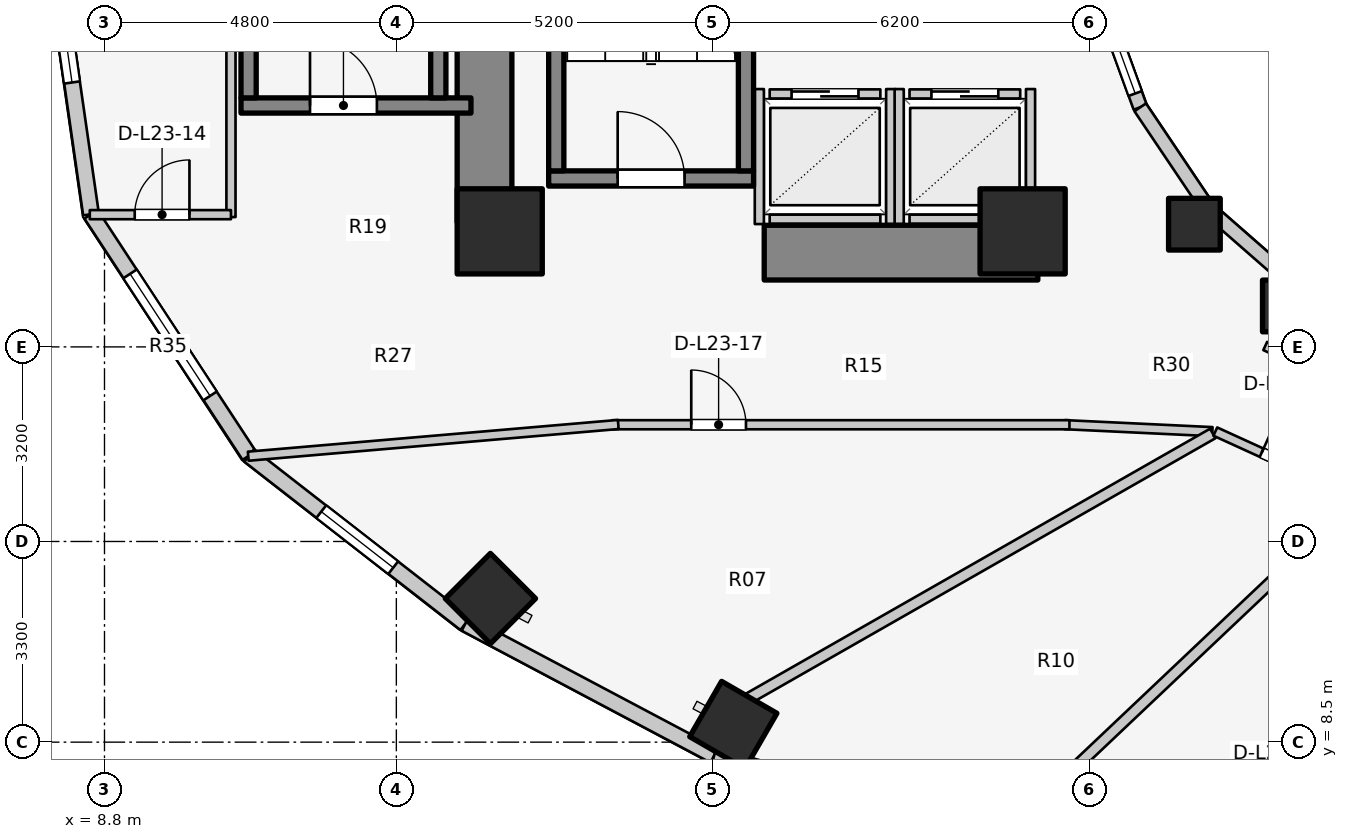
"""IFC4 building model, lengths in metres.
Left out: names, types, materials, properties, quantities, classifications, styles, units other than length and angle.
Written with IfcOpenShell. Run it as: python <this file> out.ifc"""

import sys

from ifc_helpers import new_model, si_unit, direction, frame, frame_2d, origin, origin_2d, place, context, subcontext, project, spatial, rectangle, extrude, element, fill, save


model = new_model("IFC4")
c1 = context("Model", 3, precision=1e-05, world=origin(), true_north=direction((0.0, 1.0)))
c2 = subcontext(c1, "Body", "Model", "MODEL_VIEW")
j1 = project(units=[si_unit("LENGTHUNIT", "METRE"), si_unit("PLANEANGLEUNIT", "RADIAN")], contexts=[c1])
p1 = place(None, origin())
s1 = spatial("IfcSite", under=j1, at=p1, CompositionType="ELEMENT")
p2 = place(p1, origin())
s2 = spatial("IfcBuilding", under=s1, at=p2, CompositionType="ELEMENT")
p3 = place(p2, frame((0.0, 0.0, 79.4)))
s3 = spatial("IfcBuildingStorey", under=s2, at=p3, CompositionType="ELEMENT", Elevation=79.4)
p4 = place(p3, frame((15.05, 17.05, 0.0), z_axis=(0.0, 0.0, 1.0), x_axis=(0.0, 1.0, 0.0)))
e1 = element("IfcWall", 1, at=p4, inside=s3, PredefinedType="SHEAR", context=c2, shape_type="SweptSolid", body=[
    extrude(rectangle(XDim=12.8, YDim=0.9, at=frame_2d((6.4, 0.0))), origin(), (0.0, 0.0, 1.0), 3.1),
])
p5 = place(p3, frame((19.65, 16.55, 0.0), z_axis=(0.0, 0.0, 1.0), x_axis=(1.0, 0.0, 0.0)))
e2 = element("IfcWall", 2, at=p5, inside=s3, PredefinedType="SHEAR", context=c2, shape_type="SweptSolid", body=[
    extrude(rectangle(XDim=4.5, YDim=0.9, at=frame_2d((2.25, 0.0))), origin(), (0.0, 0.0, 1.0), 3.1),
])
p6 = place(p3, frame((16.105, 17.77, 0.0), z_axis=(0.0, 0.0, 1.0), x_axis=(1.0, 0.0, 0.0)))
e3 = element("IfcWall", 3, at=p6, inside=s3, PredefinedType="SOLIDWALL", context=c2, shape_type="SweptSolid", body=[
    extrude(rectangle(XDim=3.37, YDim=0.25, at=frame_2d((1.685, 0.0))), origin(), (0.0, 0.0, 1.0), 3.1),
])
p7 = place(p6, frame((1.135, 0.0, 0.0)))
e4 = element("IfcOpeningElement", 4, at=p7, cuts=e3, PredefinedType="OPENING", context=c2, shape_type="SweptSolid", body=[
    extrude(rectangle(XDim=1.1, YDim=2.1, at=frame_2d((0.55, 1.05))), frame((0.0, 0.135, 0.0), z_axis=(0.0, -1.0, 0.0), x_axis=(1.0, 0.0, 0.0)), (0.0, 0.0, 1.0), 0.27),
])
for number, where, z_axis, x_axis in (
    (5, (16.23, 17.895, 0.0), (0.0, 0.0, 1.0), (0.0, 1.0, 0.0)),
    (6, (19.35, 17.895, 0.0), (0.0, 0.0, 1.0), (0.0, 1.0, 0.0)),
):
    element("IfcWall", number, at=place(p3, frame(where, z_axis=z_axis, x_axis=x_axis)), inside=s3, PredefinedType="SOLIDWALL", context=c2, shape_type="SweptSolid", body=[
        extrude(rectangle(XDim=7.81, YDim=0.25, at=frame_2d((3.905, 0.0))), origin(), (0.0, 0.0, 1.0), 3.1),
    ])
p8 = place(p3, frame((11.045, 18.97, 0.0), z_axis=(0.0, 0.0, 1.0), x_axis=(1.0, 0.0, 0.0)))
e7 = element("IfcWall", 7, at=p8, inside=s3, PredefinedType="SOLIDWALL", context=c2, shape_type="SweptSolid", body=[
    extrude(rectangle(XDim=3.782, YDim=0.25, at=frame_2d((1.891, 0.0))), origin(), (0.0, 0.0, 1.0), 3.1),
])
p9 = place(p8, frame((1.135, 0.0, 0.0)))
e8 = element("IfcOpeningElement", 8, at=p9, cuts=e7, PredefinedType="OPENING", context=c2, shape_type="SweptSolid", body=[
    extrude(rectangle(XDim=1.1, YDim=2.1, at=frame_2d((0.55, 1.05))), frame((0.0, 0.135, 0.0), z_axis=(0.0, -1.0, 0.0), x_axis=(1.0, 0.0, 0.0)), (0.0, 0.0, 1.0), 0.27),
])
for number, where, z_axis, x_axis in (
    (9, (11.17, 19.095, 0.0), (0.0, 0.0, 1.0), (0.0, 1.0, 0.0)),
    (10, (14.29, 19.095, 0.0), (0.0, 0.0, 1.0), (0.0, 1.0, 0.0)),
):
    element("IfcWall", number, at=place(p3, frame(where, z_axis=z_axis, x_axis=x_axis)), inside=s3, PredefinedType="SOLIDWALL", context=c2, shape_type="SweptSolid", body=[
        extrude(rectangle(XDim=7.81, YDim=0.25, at=frame_2d((3.905, 0.0))), origin(), (0.0, 0.0, 1.0), 3.1),
    ])
for number, where, z_axis, x_axis in (
    (11, (15.3, 16.9, 0.0), (0.0, 0.0, 1.0), (1.0, 0.0, 0.0)),
    (12, (23.9, 16.9, 0.0), (0.0, 0.0, 1.0), (1.0, 0.0, 0.0)),
):
    element("IfcColumn", number, at=place(p3, frame(where, z_axis=z_axis, x_axis=x_axis)), inside=s3, PredefinedType="COLUMN", context=c2, shape_type="SweptSolid", body=[
        extrude(rectangle(XDim=1.4, YDim=1.4, at=origin_2d()), origin(), (0.0, 0.0, 1.0), 3.1),
    ])
p10 = place(p3, frame((26.725, 17.018, 0.0), z_axis=(0.0, 0.0, 1.0), x_axis=(1.0, 0.0, 0.0)))
e13 = element("IfcColumn", 13, at=p10, inside=s3, PredefinedType="COLUMN", context=c2, shape_type="SweptSolid", body=[
    extrude(rectangle(XDim=0.85, YDim=0.85, at=origin_2d()), origin(), (0.0, 0.0, 1.0), 3.1),
])
p11 = place(p3, frame((15.147, 10.862, 0.0), z_axis=(0.0, 0.0, 1.0), x_axis=(-0.707106781187, -0.707106781187, 0.0)))
e14 = element("IfcColumn", 14, at=p11, inside=s3, PredefinedType="COLUMN", context=c2, shape_type="SweptSolid", body=[
    extrude(rectangle(XDim=1.05, YDim=1.05, at=origin_2d()), origin(), (0.0, 0.0, 1.0), 3.1),
])
p12 = place(p3, frame((28.27, 15.673, 0.0), z_axis=(0.0, 0.0, 1.0), x_axis=(1.0, 0.0, 0.0)))
e15 = element("IfcColumn", 15, at=p12, inside=s3, PredefinedType="COLUMN", context=c2, shape_type="SweptSolid", body=[
    extrude(rectangle(XDim=0.85, YDim=0.85, at=origin_2d()), origin(), (0.0, 0.0, 1.0), 3.1),
])
p13 = place(p3, frame((19.142, 8.782, 0.0), z_axis=(0.0, 0.0, 1.0), x_axis=(-0.5, -0.866025403784, 0.0)))
e16 = element("IfcColumn", 16, at=p13, inside=s3, PredefinedType="COLUMN", context=c2, shape_type="SweptSolid", body=[
    extrude(rectangle(XDim=1.05, YDim=1.05, at=origin_2d()), origin(), (0.0, 0.0, 1.0), 3.1),
])
p14 = place(p3, frame((25.123, 20.898, 0.0), z_axis=(0.0, 0.0, 1.0), x_axis=(0.341423187295, -0.93990968033, 0.0)))
e17 = element("IfcWall", 17, at=p14, inside=s3, PredefinedType="STANDARD", context=c2, shape_type="SweptSolid", body=[
    extrude(rectangle(XDim=2.084, YDim=0.23, at=frame_2d((1.042, 0.0))), origin(), (0.0, 0.0, 1.0), 2.84),
])
p15 = place(p14, frame((0.242, 0.0, 0.85)))
e18 = element("IfcOpeningElement", 18, at=p15, cuts=e17, PredefinedType="OPENING", context=c2, shape_type="SweptSolid", body=[
    extrude(rectangle(XDim=1.6, YDim=1.65, at=frame_2d((0.8, 0.825))), frame((0.0, 0.125, 0.0), z_axis=(0.0, -1.0, 0.0), x_axis=(1.0, 0.0, 0.0)), (0.0, 0.0, 1.0), 0.25),
])
p16 = place(p3, frame((25.834, 18.94, 0.0), z_axis=(0.0, 0.0, 1.0), x_axis=(0.558197800898, -0.829707909492, 0.0)))
e19 = element("IfcWall", 19, at=p16, inside=s3, PredefinedType="STANDARD", context=c2, shape_type="SweptSolid", body=[
    extrude(rectangle(XDim=2.027, YDim=0.23, at=frame_2d((1.013, 0.0))), origin(), (0.0, 0.0, 1.0), 2.16),
])
p17 = place(p3, frame((26.965, 17.258, 0.0), z_axis=(0.0, 0.0, 1.0), x_axis=(0.752576694707, -0.658504607869, 0.0)))
e20 = element("IfcWall", 20, at=p17, inside=s3, PredefinedType="STANDARD", context=c2, shape_type="SweptSolid", body=[
    extrude(rectangle(XDim=1.959, YDim=0.23, at=frame_2d((0.98, 0.0))), origin(), (0.0, 0.0, 1.0), 2.16),
])
p18 = place(p3, frame((7.74, 23.0, 0.0), z_axis=(0.0, 0.0, 1.0), x_axis=(0.142572472068, -0.98978436551, 0.0)))
e21 = element("IfcWall", 21, at=p18, inside=s3, PredefinedType="STANDARD", context=c2, shape_type="SweptSolid", body=[
    extrude(rectangle(XDim=5.879, YDim=0.26, at=frame_2d((2.939, 0.0))), origin(), (0.0, 0.0, 1.0), 2.85),
])
p19 = place(p18, frame((2.189, 0.0, 0.75)))
e22 = element("IfcOpeningElement", 22, at=p19, cuts=e21, PredefinedType="OPENING", context=c2, shape_type="SweptSolid", body=[
    extrude(rectangle(XDim=1.5, YDim=1.6, at=frame_2d((0.75, 0.8))), frame((0.0, 0.14, 0.0), z_axis=(0.0, -1.0, 0.0), x_axis=(1.0, 0.0, 0.0)), (0.0, 0.0, 1.0), 0.28),
])
p20 = place(p3, frame((8.578, 17.181, 0.0), z_axis=(0.0, 0.0, 1.0), x_axis=(0.548283220945, -0.836292717672, 0.0)))
e23 = element("IfcWall", 23, at=p20, inside=s3, PredefinedType="STANDARD", context=c2, shape_type="SweptSolid", body=[
    extrude(rectangle(XDim=4.744, YDim=0.26, at=frame_2d((2.372, 0.0))), origin(), (0.0, 0.0, 1.0), 2.85),
])
p21 = place(p20, frame((1.172, 0.0, 0.75)))
e24 = element("IfcOpeningElement", 24, at=p21, cuts=e23, PredefinedType="OPENING", context=c2, shape_type="SweptSolid", body=[
    extrude(rectangle(XDim=2.4, YDim=1.7, at=frame_2d((1.2, 0.85))), frame((0.0, 0.14, 0.0), z_axis=(0.0, -1.0, 0.0), x_axis=(1.0, 0.0, 0.0)), (0.0, 0.0, 1.0), 0.28),
])
p22 = place(p3, frame((11.179, 13.214, 0.0), z_axis=(0.0, 0.0, 1.0), x_axis=(0.789127449954, -0.614229491094, 0.0)))
e25 = element("IfcWall", 25, at=p22, inside=s3, PredefinedType="STANDARD", context=c2, shape_type="SweptSolid", body=[
    extrude(rectangle(XDim=4.505, YDim=0.26, at=frame_2d((2.252, 0.0))), origin(), (0.0, 0.0, 1.0), 2.85),
])
p23 = place(p22, frame((1.502, 0.0, 0.75)))
e26 = element("IfcOpeningElement", 26, at=p23, cuts=e25, PredefinedType="OPENING", context=c2, shape_type="SweptSolid", body=[
    extrude(rectangle(XDim=1.5, YDim=1.6, at=frame_2d((0.75, 0.8))), frame((0.0, 0.14, 0.0), z_axis=(0.0, -1.0, 0.0), x_axis=(1.0, 0.0, 0.0)), (0.0, 0.0, 1.0), 0.28),
])
p24 = place(p3, frame((14.734, 10.447, 0.0), z_axis=(0.0, 0.0, 1.0), x_axis=(0.883668636807, -0.4681129568, 0.0)))
e27 = element("IfcWall", 27, at=p24, inside=s3, PredefinedType="STANDARD", context=c2, shape_type="SweptSolid", body=[
    extrude(rectangle(XDim=4.631, YDim=0.26, at=frame_2d((2.316, 0.0))), origin(), (0.0, 0.0, 1.0), 2.85),
])
p25 = place(p3, frame((18.827, 8.279, 0.0), z_axis=(0.0, 0.0, 1.0), x_axis=(0.962938491413, -0.269721081407, 0.0)))
e28 = element("IfcWall", 28, at=p25, inside=s3, PredefinedType="STANDARD", context=c2, shape_type="SweptSolid", body=[
    extrude(rectangle(XDim=5.563, YDim=0.26, at=frame_2d((2.782, 0.0))), origin(), (0.0, 0.0, 1.0), 2.85),
])
p26 = place(p25, frame((1.582, 0.0, 0.75)))
e29 = element("IfcOpeningElement", 29, at=p26, cuts=e28, PredefinedType="OPENING", context=c2, shape_type="SweptSolid", body=[
    extrude(rectangle(XDim=2.4, YDim=1.7, at=frame_2d((1.2, 0.85))), frame((0.0, 0.14, 0.0), z_axis=(0.0, -1.0, 0.0), x_axis=(1.0, 0.0, 0.0)), (0.0, 0.0, 1.0), 0.28),
])
p27 = place(p3, frame((19.74, 19.16, 0.0), z_axis=(0.0, 0.0, 1.0), x_axis=(1.0, 0.0, 0.0)))
e30 = element("IfcWall", 30, at=p27, inside=s3, PredefinedType="SOLIDWALL", context=c2, shape_type="SweptSolid", body=[
    extrude(rectangle(XDim=1.82, YDim=0.15, at=frame_2d((0.91, 0.0))), origin(), (0.0, 0.0, 1.0), 2.855),
])
p28 = place(p27, frame((0.36, 0.0, 0.0)))
e31 = element("IfcOpeningElement", 31, at=p28, cuts=e30, PredefinedType="OPENING", context=c2, shape_type="SweptSolid", body=[
    extrude(rectangle(XDim=1.1, YDim=2.1, at=frame_2d((0.55, 1.05))), frame((0.0, 0.085, 0.0), z_axis=(0.0, -1.0, 0.0), x_axis=(1.0, 0.0, 0.0)), (0.0, 0.0, 1.0), 0.17),
])
p29 = place(p3, frame((19.74, 17.1, 0.0), z_axis=(0.0, 0.0, 1.0), x_axis=(1.0, 0.0, 0.0)))
e32 = element("IfcWall", 32, at=p29, inside=s3, PredefinedType="SOLIDWALL", context=c2, shape_type="SweptSolid", body=[
    extrude(rectangle(XDim=1.82, YDim=0.15, at=frame_2d((0.91, 0.0))), origin(), (0.0, 0.0, 1.0), 2.855),
])
p30 = place(p3, frame((19.57, 17.02, 0.0), z_axis=(0.0, 0.0, 1.0), x_axis=(0.0, 1.0, 0.0)))
e33 = element("IfcWall", 33, at=p30, inside=s3, PredefinedType="SOLIDWALL", context=c2, shape_type="SweptSolid", body=[
    extrude(rectangle(XDim=2.22, YDim=0.15, at=frame_2d((1.11, 0.0))), origin(), (0.0, 0.0, 1.0), 2.12),
])
p31 = place(p3, frame((21.73, 17.02, 0.0), z_axis=(0.0, 0.0, 1.0), x_axis=(0.0, 1.0, 0.0)))
e34 = element("IfcWall", 34, at=p31, inside=s3, PredefinedType="SOLIDWALL", context=c2, shape_type="SweptSolid", body=[
    extrude(rectangle(XDim=2.22, YDim=0.15, at=frame_2d((1.11, 0.0))), origin(), (0.0, 0.0, 1.0), 2.855),
])
p32 = place(p3, frame((22.04, 19.16, 0.0), z_axis=(0.0, 0.0, 1.0), x_axis=(1.0, 0.0, 0.0)))
e35 = element("IfcWall", 35, at=p32, inside=s3, PredefinedType="SOLIDWALL", context=c2, shape_type="SweptSolid", body=[
    extrude(rectangle(XDim=1.82, YDim=0.15, at=frame_2d((0.91, 0.0))), origin(), (0.0, 0.0, 1.0), 2.12),
])
p33 = place(p32, frame((0.36, 0.0, 0.0)))
e36 = element("IfcOpeningElement", 36, at=p33, cuts=e35, PredefinedType="OPENING", context=c2, shape_type="SweptSolid", body=[
    extrude(rectangle(XDim=1.1, YDim=2.1, at=frame_2d((0.55, 1.05))), frame((0.0, 0.085, 0.0), z_axis=(0.0, -1.0, 0.0), x_axis=(1.0, 0.0, 0.0)), (0.0, 0.0, 1.0), 0.17),
])
p34 = place(p3, frame((22.04, 17.1, 0.0), z_axis=(0.0, 0.0, 1.0), x_axis=(1.0, 0.0, 0.0)))
e37 = element("IfcWall", 37, at=p34, inside=s3, PredefinedType="SOLIDWALL", context=c2, shape_type="SweptSolid", body=[
    extrude(rectangle(XDim=1.82, YDim=0.15, at=frame_2d((0.91, 0.0))), origin(), (0.0, 0.0, 1.0), 2.12),
])
p35 = place(p3, frame((21.87, 17.02, 0.0), z_axis=(0.0, 0.0, 1.0), x_axis=(0.0, 1.0, 0.0)))
e38 = element("IfcWall", 38, at=p35, inside=s3, PredefinedType="SOLIDWALL", context=c2, shape_type="SweptSolid", body=[
    extrude(rectangle(XDim=2.22, YDim=0.15, at=frame_2d((1.11, 0.0))), origin(), (0.0, 0.0, 1.0), 2.855),
])
p36 = place(p3, frame((24.03, 17.02, 0.0), z_axis=(0.0, 0.0, 1.0), x_axis=(0.0, 1.0, 0.0)))
e39 = element("IfcWall", 39, at=p36, inside=s3, PredefinedType="SOLIDWALL", context=c2, shape_type="SweptSolid", body=[
    extrude(rectangle(XDim=2.22, YDim=0.15, at=frame_2d((1.11, 0.0))), origin(), (0.0, 0.0, 1.0), 2.12),
])
p37 = place(p3, frame((27.89, 15.015, 0.0), z_axis=(0.0, 0.0, 1.0), x_axis=(0.906943449489, -0.421252393975, 0.0)))
e40 = element("IfcWall", 40, at=p37, inside=s3, PredefinedType="PARTITIONING", context=c2, shape_type="SweptSolid", body=[
    extrude(rectangle(XDim=2.186, YDim=0.15, at=frame_2d((1.093, 0.0))), origin(), (0.0, 0.0, 1.0), 2.272),
])
p38 = place(p3, frame((10.88, 17.135, 0.0), z_axis=(0.0, 0.0, 1.0), x_axis=(0.0, 1.0, 0.0)))
e41 = element("IfcWall", 41, at=p38, inside=s3, PredefinedType="PARTITIONING", context=c2, shape_type="SweptSolid", body=[
    extrude(rectangle(XDim=11.73, YDim=0.15, at=frame_2d((5.865, 0.0))), origin(), (0.0, 0.0, 1.0), 2.12),
])
p39 = place(p3, frame((8.558, 17.175, 0.0), z_axis=(0.0, 0.0, 1.0), x_axis=(1.0, 0.0, 0.0)))
e42 = element("IfcWall", 42, at=p39, inside=s3, PredefinedType="PARTITIONING", context=c2, shape_type="SweptSolid", body=[
    extrude(rectangle(XDim=2.322, YDim=0.15, at=frame_2d((1.161, 0.0))), origin(), (0.0, 0.0, 1.0), 2.855),
])
p40 = place(p39, frame((0.739, 0.0, 0.0)))
e43 = element("IfcOpeningElement", 43, at=p40, cuts=e42, PredefinedType="OPENING", context=c2, shape_type="SweptSolid", body=[
    extrude(rectangle(XDim=0.9, YDim=2.1, at=frame_2d((0.45, 1.05))), frame((0.0, 0.085, 0.0), z_axis=(0.0, -1.0, 0.0), x_axis=(1.0, 0.0, 0.0)), (0.0, 0.0, 1.0), 0.17),
])
p41 = place(p3, frame((27.02, 13.606, 0.0), z_axis=(0.0, 0.0, 1.0), x_axis=(-0.998877427952, 0.047369651964, 0.0)))
e44 = element("IfcWall", 44, at=p41, inside=s3, PredefinedType="PARTITIONING", context=c2, shape_type="SweptSolid", body=[
    extrude(rectangle(XDim=2.433, YDim=0.15, at=frame_2d((1.216, 0.0))), origin(), (0.0, 0.0, 1.0), 2.272),
])
p42 = place(p3, frame((17.15, 13.72, 0.0), z_axis=(0.0, 0.0, 1.0), x_axis=(1.0, 0.0, 0.0)))
e45 = element("IfcWall", 45, at=p42, inside=s3, PredefinedType="PARTITIONING", context=c2, shape_type="SweptSolid", body=[
    extrude(rectangle(XDim=7.52, YDim=0.15, at=frame_2d((3.76, 0.0))), origin(), (0.0, 0.0, 1.0), 2.272),
])
p43 = place(p42, frame((1.3, 0.0, 0.0)))
e46 = element("IfcOpeningElement", 46, at=p43, cuts=e45, PredefinedType="OPENING", context=c2, shape_type="SweptSolid", body=[
    extrude(rectangle(XDim=0.9, YDim=2.1, at=frame_2d((0.45, 1.05))), frame((0.0, 0.085, 0.0), z_axis=(0.0, -1.0, 0.0), x_axis=(1.0, 0.0, 0.0)), (0.0, 0.0, 1.0), 0.17),
])
p44 = place(p3, frame((17.25, 13.724, 0.0), z_axis=(0.0, 0.0, 1.0), x_axis=(-0.996341886029, -0.085456691633, 0.0)))
e47 = element("IfcWall", 47, at=p44, inside=s3, PredefinedType="PARTITIONING", context=c2, shape_type="SweptSolid", body=[
    extrude(rectangle(XDim=6.108, YDim=0.15, at=frame_2d((3.054, 0.0))), origin(), (0.0, 0.0, 1.0), 2.142),
])
p45 = place(p3, frame((27.027, 13.576, 0.0), z_axis=(0.0, 0.0, 1.0), x_axis=(-0.868484076301, -0.495717065685, 0.0)))
e48 = element("IfcWall", 48, at=p45, inside=s3, PredefinedType="PARTITIONING", context=c2, shape_type="SweptSolid", body=[
    extrude(rectangle(XDim=8.789, YDim=0.18, at=frame_2d((4.394, 0.0))), origin(), (0.0, 0.0, 1.0), 2.272),
])
p46 = place(p3, frame((29.411, 12.482, 0.0), z_axis=(0.0, 0.0, 1.0), x_axis=(-0.726306601605, -0.687370875485, 0.0)))
e49 = element("IfcWall", 49, at=p46, inside=s3, PredefinedType="PARTITIONING", context=c2, shape_type="SweptSolid", body=[
    extrude(rectangle(XDim=6.76, YDim=0.18, at=frame_2d((3.38, 0.0))), origin(), (0.0, 0.0, 1.0), 2.272),
])
p47 = place(p3, frame((27.069, 13.607, 0.0), z_axis=(0.0, 0.0, 1.0), x_axis=(0.909747571199, -0.415161843982, 0.0)))
e50 = element("IfcWall", 50, at=p47, inside=s3, PredefinedType="PARTITIONING", context=c2, shape_type="SweptSolid", body=[
    extrude(rectangle(XDim=2.625, YDim=0.15, at=frame_2d((1.312, 0.0))), origin(), (0.0, 0.0, 1.0), 2.272),
])
p48 = place(p47, frame((0.838, 0.0, 0.0)))
e51 = element("IfcOpeningElement", 51, at=p48, cuts=e50, PredefinedType="OPENING", context=c2, shape_type="SweptSolid", body=[
    extrude(rectangle(XDim=0.95, YDim=2.1, at=frame_2d((0.475, 1.05))), frame((0.0, 0.085, 0.0), z_axis=(0.0, -1.0, 0.0), x_axis=(1.0, 0.0, 0.0)), (0.0, 0.0, 1.0), 0.17),
])
p49 = place(p15, origin())
e52 = element("IfcWindow", 52, at=p49, inside=s3, PartitioningType="SINGLE_PANEL", PredefinedType="WINDOW", context=c2, shape_type="SweptSolid", body=[
    extrude(rectangle(XDim=1.6, YDim=1.65, at=frame_2d((0.8, 0.825))), frame((0.0, 0.03, 0.0), z_axis=(0.0, -1.0, 0.0), x_axis=(1.0, 0.0, 0.0)), (0.0, 0.0, 1.0), 0.06),
])
fill(e18, e52)
p50 = place(p19, origin())
e53 = element("IfcWindow", 53, at=p50, inside=s3, PartitioningType="SINGLE_PANEL", PredefinedType="WINDOW", context=c2, shape_type="SweptSolid", body=[
    extrude(rectangle(XDim=1.5, YDim=1.6, at=frame_2d((0.75, 0.8))), frame((0.0, 0.03, 0.0), z_axis=(0.0, -1.0, 0.0), x_axis=(1.0, 0.0, 0.0)), (0.0, 0.0, 1.0), 0.06),
])
fill(e22, e53)
p51 = place(p21, origin())
e54 = element("IfcWindow", 54, at=p51, inside=s3, PartitioningType="SINGLE_PANEL", PredefinedType="WINDOW", context=c2, shape_type="SweptSolid", body=[
    extrude(rectangle(XDim=2.4, YDim=1.7, at=frame_2d((1.2, 0.85))), frame((0.0, 0.03, 0.0), z_axis=(0.0, -1.0, 0.0), x_axis=(1.0, 0.0, 0.0)), (0.0, 0.0, 1.0), 0.06),
])
fill(e24, e54)
p52 = place(p23, origin())
e55 = element("IfcWindow", 55, at=p52, inside=s3, PartitioningType="SINGLE_PANEL", PredefinedType="WINDOW", context=c2, shape_type="SweptSolid", body=[
    extrude(rectangle(XDim=1.5, YDim=1.6, at=frame_2d((0.75, 0.8))), frame((0.0, 0.03, 0.0), z_axis=(0.0, -1.0, 0.0), x_axis=(1.0, 0.0, 0.0)), (0.0, 0.0, 1.0), 0.06),
])
fill(e26, e55)
p53 = place(p7, origin())
e56 = element("IfcDoor", 56, at=p53, inside=s3, OperationType="SINGLE_SWING_LEFT", PredefinedType="DOOR", context=c2, shape_type="SweptSolid", body=[
    extrude(rectangle(XDim=1.1, YDim=2.1, at=frame_2d((0.55, 1.05))), frame((0.0, 0.025, 0.0), z_axis=(0.0, -1.0, 0.0), x_axis=(1.0, 0.0, 0.0)), (0.0, 0.0, 1.0), 0.05),
])
fill(e4, e56)
p54 = place(p9, origin())
e57 = element("IfcDoor", 57, at=p54, inside=s3, OperationType="SINGLE_SWING_LEFT", PredefinedType="DOOR", context=c2, shape_type="SweptSolid", body=[
    extrude(rectangle(XDim=1.1, YDim=2.1, at=frame_2d((0.55, 1.05))), frame((0.0, 0.025, 0.0), z_axis=(0.0, -1.0, 0.0), x_axis=(1.0, 0.0, 0.0)), (0.0, 0.0, 1.0), 0.05),
])
fill(e8, e57)
p55 = place(p28, origin())
e58 = element("IfcDoor", 58, at=p55, inside=s3, OperationType="DOUBLE_DOOR_SLIDING", PredefinedType="DOOR", context=c2, shape_type="SweptSolid", body=[
    extrude(rectangle(XDim=1.1, YDim=2.1, at=frame_2d((0.55, 1.05))), frame((0.0, 0.025, 0.0), z_axis=(0.0, -1.0, 0.0), x_axis=(1.0, 0.0, 0.0)), (0.0, 0.0, 1.0), 0.05),
])
fill(e31, e58)
p56 = place(p33, origin())
e59 = element("IfcDoor", 59, at=p56, inside=s3, OperationType="DOUBLE_DOOR_SLIDING", PredefinedType="DOOR", context=c2, shape_type="SweptSolid", body=[
    extrude(rectangle(XDim=1.1, YDim=2.1, at=frame_2d((0.55, 1.05))), frame((0.0, 0.025, 0.0), z_axis=(0.0, -1.0, 0.0), x_axis=(1.0, 0.0, 0.0)), (0.0, 0.0, 1.0), 0.05),
])
fill(e36, e59)
p57 = place(p40, origin())
e60 = element("IfcDoor", 60, at=p57, inside=s3, OperationType="SINGLE_SWING_RIGHT", PredefinedType="DOOR", context=c2, shape_type="SweptSolid", body=[
    extrude(rectangle(XDim=0.9, YDim=2.1, at=frame_2d((0.45, 1.05))), frame((0.0, 0.025, 0.0), z_axis=(0.0, -1.0, 0.0), x_axis=(1.0, 0.0, 0.0)), (0.0, 0.0, 1.0), 0.05),
])
fill(e43, e60)
p58 = place(p43, origin())
e61 = element("IfcDoor", 61, at=p58, inside=s3, OperationType="SINGLE_SWING_LEFT", PredefinedType="DOOR", context=c2, shape_type="SweptSolid", body=[
    extrude(rectangle(XDim=0.9, YDim=2.1, at=frame_2d((0.45, 1.05))), frame((0.0, 0.025, 0.0), z_axis=(0.0, -1.0, 0.0), x_axis=(1.0, 0.0, 0.0)), (0.0, 0.0, 1.0), 0.05),
])
fill(e46, e61)
p59 = place(p48, origin())
e62 = element("IfcDoor", 62, at=p59, inside=s3, OperationType="SINGLE_SWING_LEFT", PredefinedType="DOOR", context=c2, shape_type="SweptSolid", body=[
    extrude(rectangle(XDim=0.95, YDim=2.1, at=frame_2d((0.475, 1.05))), frame((0.0, 0.025, 0.0), z_axis=(0.0, -1.0, 0.0), x_axis=(1.0, 0.0, 0.0)), (0.0, 0.0, 1.0), 0.05),
])
fill(e51, e62)
save(model, sys.argv[1])
